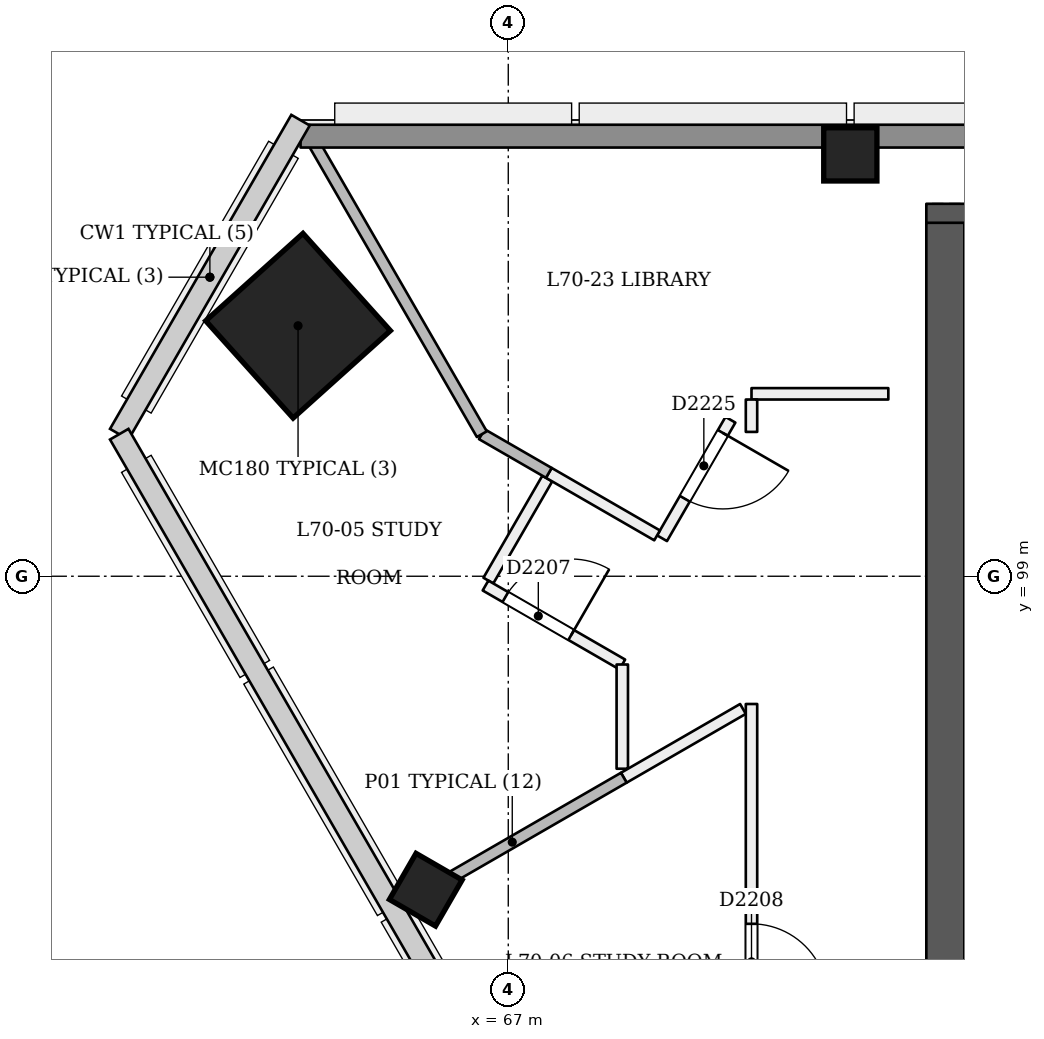
"""IFC4 building model, lengths in metres.
Left out: names, types, materials, properties, quantities, classifications, styles, units other than length and angle.
Written with IfcOpenShell. Run it as: python <this file> out.ifc"""

import sys

from ifc_helpers import new_model, si_unit, direction, frame, frame_2d, origin, origin_2d, place, context, subcontext, project, spatial, rectangle, extrude, element, fill, save


model = new_model("IFC4")
c1 = context("Model", 3, precision=1e-05, world=origin(), true_north=direction((0.0, 1.0)))
c2 = subcontext(c1, "Body", "Model", "MODEL_VIEW")
j1 = project(units=[si_unit("LENGTHUNIT", "METRE"), si_unit("PLANEANGLEUNIT", "RADIAN")], contexts=[c1])
p1 = place(None, origin())
s1 = spatial("IfcSite", under=j1, at=p1, CompositionType="ELEMENT")
p2 = place(p1, origin())
s2 = spatial("IfcBuilding", under=s1, at=p2, CompositionType="ELEMENT")
p3 = place(p2, frame((0.0, 0.0, 271.6)))
s3 = spatial("IfcBuildingStorey", under=s2, at=p3, CompositionType="ELEMENT", Elevation=271.6)
p4 = place(p3, frame((97.25, 103.65, 0.0), z_axis=(0.0, 0.0, 1.0), x_axis=(-1.0, 0.0, 0.0)))
e1 = element("IfcWall", 1, at=p4, inside=s3, PredefinedType="SHEAR", context=c2, shape_type="SweptSolid", body=[
    extrude(rectangle(XDim=24.75, YDim=0.5, at=frame_2d((12.375, 0.0))), origin(), (0.0, 0.0, 1.0), 3.6),
])
p5 = place(p3, frame((72.75, 103.65, 0.0), z_axis=(0.0, 0.0, 1.0), x_axis=(0.0, -1.0, 0.0)))
e2 = element("IfcWall", 2, at=p5, inside=s3, PredefinedType="SHEAR", context=c2, shape_type="SweptSolid", body=[
    extrude(rectangle(XDim=10.75, YDim=0.5, at=frame_2d((5.375, 0.0))), origin(), (0.0, 0.0, 1.0), 3.6),
])
p6 = place(p3, frame((64.2, 102.284, 0.0), z_axis=(0.028403739082, 0.009219352065, 0.999554016126), x_axis=(-0.865117078347, 0.501172625173, 0.019960975165)))
e3 = element("IfcColumn", 3, at=p6, inside=s3, PredefinedType="COLUMN", context=c2, shape_type="SweptSolid", body=[
    extrude(rectangle(XDim=1.72, YDim=1.72, at=origin_2d()), origin(), (0.0, 0.0, 1.0), 3.602),
])
p7 = place(p3, frame((71.5, 104.55, 0.0), z_axis=(0.0, 0.0, 1.0), x_axis=(1.0, 0.0, 0.0)))
e4 = element("IfcColumn", 4, at=p7, inside=s3, PredefinedType="COLUMN", context=c2, shape_type="SweptSolid", body=[
    extrude(rectangle(XDim=0.7, YDim=0.7, at=origin_2d()), origin(), (0.0, 0.0, 1.0), 3.6),
])
p8 = place(p3, frame((65.887, 94.829, -0.021), z_axis=(0.022222852987, 0.038483477124, 0.999012095419), x_axis=(-0.865639360837, -0.499186706709, 0.038485436403)))
e5 = element("IfcColumn", 5, at=p8, inside=s3, PredefinedType="COLUMN", context=c2, shape_type="SweptSolid", body=[
    extrude(rectangle(XDim=0.7, YDim=0.7, at=origin_2d()), origin(), (0.0, 0.0, 1.0), 3.604),
])
p9 = place(p3, frame((67.513, 100.285, 0.0), z_axis=(0.0, 0.0, 1.0), x_axis=(-0.499899694197, -0.866083307622, 0.0)))
e6 = element("IfcWall", 6, at=p9, inside=s3, PredefinedType="PARTITIONING", context=c2, shape_type="SweptSolid", body=[
    extrude(rectangle(XDim=1.55, YDim=0.15, at=frame_2d((0.775, 0.0))), origin(), (0.0, 0.0, 1.0), 3.2),
])
p10 = place(p3, frame((66.701, 98.878, 0.0), z_axis=(0.0, 0.0, 1.0), x_axis=(0.866029041019, -0.499993700073, 0.0)))
e7 = element("IfcWall", 7, at=p10, inside=s3, PredefinedType="PARTITIONING", context=c2, shape_type="SweptSolid", body=[
    extrude(rectangle(XDim=2.078, YDim=0.15, at=frame_2d((1.039, 0.0))), origin(), (0.0, 0.0, 1.0), 3.2),
])
p11 = place(p10, frame((0.302, 0.0, 0.0)))
e8 = element("IfcOpeningElement", 8, at=p11, cuts=e7, PredefinedType="OPENING", context=c2, shape_type="SweptSolid", body=[
    extrude(rectangle(XDim=1.0, YDim=2.1, at=frame_2d((0.5, 1.05))), frame((0.0, 0.085, 0.0), z_axis=(0.0, -1.0, 0.0), x_axis=(1.0, 0.0, 0.0)), (0.0, 0.0, 1.0), 0.171),
])
p12 = place(p3, frame((68.5, 97.839, 0.0), z_axis=(0.0, 0.0, 1.0), x_axis=(0.0, -1.0, 0.0)))
e9 = element("IfcWall", 9, at=p12, inside=s3, PredefinedType="PARTITIONING", context=c2, shape_type="SweptSolid", body=[
    extrude(rectangle(XDim=1.371, YDim=0.15, at=frame_2d((0.686, 0.0))), origin(), (0.0, 0.0, 1.0), 3.2),
])
p13 = place(p3, frame((68.52, 96.349, 0.0), z_axis=(0.0, 0.0, 1.0), x_axis=(0.866001380566, 0.500041607127, 0.0)))
e10 = element("IfcWall", 10, at=p13, inside=s3, PredefinedType="PARTITIONING", context=c2, shape_type="SweptSolid", body=[
    extrude(rectangle(XDim=1.81, YDim=0.15, at=frame_2d((0.905, 0.0))), origin(), (0.0, 0.0, 1.0), 3.2),
])
p14 = place(p3, frame((70.2, 97.319, 0.0), z_axis=(0.0, 0.0, 1.0), x_axis=(0.0, -1.0, 0.0)))
e11 = element("IfcWall", 11, at=p14, inside=s3, PredefinedType="PARTITIONING", context=c2, shape_type="SweptSolid", body=[
    extrude(rectangle(XDim=6.719, YDim=0.15, at=frame_2d((3.36, 0.0))), origin(), (0.0, 0.0, 1.0), 3.2),
])
p15 = place(p14, frame((2.892, 0.0, 0.0)))
e12 = element("IfcOpeningElement", 12, at=p15, cuts=e11, PredefinedType="OPENING", context=c2, shape_type="SweptSolid", body=[
    extrude(rectangle(XDim=1.0, YDim=2.1, at=frame_2d((0.5, 1.05))), frame((0.0, 0.085, 0.0), z_axis=(0.0, -1.0, 0.0), x_axis=(1.0, 0.0, 0.0)), (0.0, 0.0, 1.0), 0.171),
])
p16 = place(p3, frame((72.0, 101.4, 0.0), z_axis=(0.0, 0.0, 1.0), x_axis=(-1.0, 0.0, 0.0)))
e13 = element("IfcWall", 13, at=p16, inside=s3, PredefinedType="PARTITIONING", context=c2, shape_type="SweptSolid", body=[
    extrude(rectangle(XDim=1.8, YDim=0.15, at=frame_2d((0.9, 0.0))), origin(), (0.0, 0.0, 1.0), 3.2),
])
p17 = place(p3, frame((70.2, 101.325, 0.0), z_axis=(0.0, 0.0, 1.0), x_axis=(0.0, -1.0, 0.0)))
e14 = element("IfcWall", 14, at=p17, inside=s3, PredefinedType="PARTITIONING", context=c2, shape_type="SweptSolid", body=[
    extrude(rectangle(XDim=0.426, YDim=0.15, at=frame_2d((0.213, 0.0))), origin(), (0.0, 0.0, 1.0), 3.2),
])
p18 = place(p3, frame((69.923, 101.059, 0.0), z_axis=(0.0, 0.0, 1.0), x_axis=(-0.499961193289, -0.866047807691, 0.0)))
e15 = element("IfcWall", 15, at=p18, inside=s3, PredefinedType="PARTITIONING", context=c2, shape_type="SweptSolid", body=[
    extrude(rectangle(XDim=1.8, YDim=0.15, at=frame_2d((0.9, 0.0))), origin(), (0.0, 0.0, 1.0), 3.2),
])
p19 = place(p18, frame((0.2, 0.0, 0.0)))
e16 = element("IfcOpeningElement", 16, at=p19, cuts=e15, PredefinedType="OPENING", context=c2, shape_type="SweptSolid", body=[
    extrude(rectangle(XDim=1.0, YDim=2.1, at=frame_2d((0.5, 1.05))), frame((0.0, 0.085, 0.0), z_axis=(0.0, -1.0, 0.0), x_axis=(1.0, 0.0, 0.0)), (0.0, 0.0, 1.0), 0.171),
])
p20 = place(p3, frame((68.958, 99.538, 0.0), z_axis=(0.0, 0.0, 1.0), x_axis=(-0.866015045157, 0.50001794124, 0.0)))
e17 = element("IfcWall", 17, at=p20, inside=s3, PredefinedType="PARTITIONING", context=c2, shape_type="SweptSolid", body=[
    extrude(rectangle(XDim=1.645, YDim=0.15, at=frame_2d((0.823, 0.0))), origin(), (0.0, 0.0, 1.0), 3.2),
])
p21 = place(p3, frame((65.585, 94.655, 0.0), z_axis=(0.0, 0.0, 1.0), x_axis=(0.866022438472, 0.500005136037, 0.0)))
e18 = element("IfcWall", 18, at=p21, inside=s3, PredefinedType="PARTITIONING", context=c2, shape_type="SweptSolid", body=[
    extrude(rectangle(XDim=3.389, YDim=0.15, at=frame_2d((1.695, 0.0))), origin(), (0.0, 0.0, 1.0), 2.7),
])
p22 = place(p3, frame((67.533, 100.36, 0.0), z_axis=(0.0, 0.0, 1.0), x_axis=(-0.866049759928, 0.499957811549, 0.0)))
e19 = element("IfcWall", 19, at=p22, inside=s3, PredefinedType="PARTITIONING", context=c2, shape_type="SweptSolid", body=[
    extrude(rectangle(XDim=1.018, YDim=0.15, at=frame_2d((0.509, 0.0))), origin(), (0.0, 0.0, 1.0), 3.2),
])
p23 = place(p3, frame((66.652, 100.869, 0.0), z_axis=(0.0, 0.0, 1.0), x_axis=(-0.500014543469, 0.866017006946, 0.0)))
e20 = element("IfcWall", 20, at=p23, inside=s3, PredefinedType="PARTITIONING", context=c2, shape_type="SweptSolid", body=[
    extrude(rectangle(XDim=4.655, YDim=0.15, at=frame_2d((2.327, 0.0))), origin(), (0.0, 0.0, 1.0), 2.7),
])
p24 = place(p3, frame((64.267, 104.79, 0.0), z_axis=(0.0, 0.0, 1.0), x_axis=(1.0, 0.0, 0.0)))
e21 = element("IfcWall", 21, at=p24, inside=s3, PredefinedType="SOLIDWALL", context=c2, shape_type="SweptSolid", body=[
    extrude(rectangle(XDim=41.466, YDim=0.3, at=frame_2d((20.733, 0.0))), origin(), (0.0, 0.0, 1.0), 2.7),
])
p25 = place(p11, origin())
e22 = element("IfcDoor", 22, at=p25, inside=s3, OperationType="SINGLE_SWING_RIGHT", PredefinedType="NOTDEFINED", context=c2, shape_type="SweptSolid", body=[
    extrude(rectangle(XDim=1.0, YDim=2.1, at=frame_2d((0.5, 1.05))), frame((0.0, 0.025, 0.0), z_axis=(0.0, -1.0, 0.0), x_axis=(1.0, 0.0, 0.0)), (0.0, 0.0, 1.0), 0.05),
])
fill(e8, e22)
p26 = place(p15, origin())
e23 = element("IfcDoor", 23, at=p26, inside=s3, OperationType="SINGLE_SWING_RIGHT", PredefinedType="NOTDEFINED", context=c2, shape_type="SweptSolid", body=[
    extrude(rectangle(XDim=1.0, YDim=2.1, at=frame_2d((0.5, 1.05))), frame((0.0, 0.025, 0.0), z_axis=(0.0, -1.0, 0.0), x_axis=(1.0, 0.0, 0.0)), (0.0, 0.0, 1.0), 0.05),
])
fill(e12, e23)
p27 = place(p19, origin())
e24 = element("IfcDoor", 24, at=p27, inside=s3, OperationType="SINGLE_SWING_LEFT", PredefinedType="NOTDEFINED", context=c2, shape_type="SweptSolid", body=[
    extrude(rectangle(XDim=1.0, YDim=2.1, at=frame_2d((0.5, 1.05))), frame((0.0, 0.025, 0.0), z_axis=(0.0, -1.0, 0.0), x_axis=(1.0, 0.0, 0.0)), (0.0, 0.0, 1.0), 0.05),
])
fill(e16, e24)
save(model, sys.argv[1])
